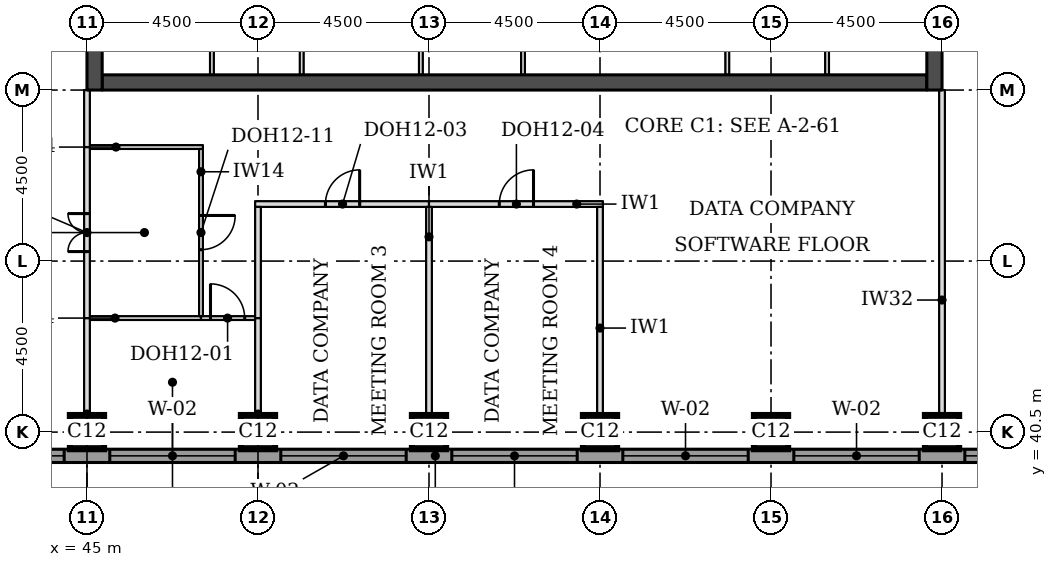
"""IFC4 building model, lengths in metres.
Left out: names, types, materials, properties, quantities, classifications, styles, units other than length and angle.
Written with IfcOpenShell. Run it as: python <this file> out.ifc"""

import sys

from ifc_helpers import new_model, si_unit, direction, frame, frame_2d, origin, origin_2d, place, context, subcontext, project, spatial, rectangle, extrude, element, fill, save


model = new_model("IFC4")
c1 = context("Model", 3, precision=1e-05, world=origin(), true_north=direction((0.0, 1.0)))
c2 = subcontext(c1, "Body", "Model", "MODEL_VIEW")
j1 = project(units=[si_unit("LENGTHUNIT", "METRE"), si_unit("PLANEANGLEUNIT", "RADIAN")], contexts=[c1])
p1 = place(None, origin())
s1 = spatial("IfcSite", under=j1, at=p1, CompositionType="ELEMENT")
p2 = place(p1, origin())
s2 = spatial("IfcBuilding", under=s1, at=p2, CompositionType="ELEMENT")
p3 = place(p2, frame((0.0, 0.0, 252.6)))
s3 = spatial("IfcBuildingStorey", under=s2, at=p3, CompositionType="ELEMENT", Elevation=252.6)
for number, where, z_axis, x_axis in (
    (1, (45.0, 40.5, 0.0), (0.0, 0.0, 1.0), (1.0, 0.0, 0.0)),
    (2, (49.5, 40.5, 0.0), (0.0, 0.0, 1.0), (1.0, 0.0, 0.0)),
    (3, (54.0, 40.5, 0.0), (0.0, 0.0, 1.0), (1.0, 0.0, 0.0)),
    (4, (58.5, 40.5, 0.0), (0.0, 0.0, 1.0), (1.0, 0.0, 0.0)),
    (5, (63.0, 40.5, 0.0), (0.0, 0.0, 1.0), (1.0, 0.0, 0.0)),
    (6, (67.5, 40.5, 0.0), (0.0, 0.0, 1.0), (1.0, 0.0, 0.0)),
):
    element("IfcColumn", number, at=place(p3, frame(where, z_axis=z_axis, x_axis=x_axis)), inside=s3, PredefinedType="COLUMN", context=c2, shape_type="SweptSolid", body=[
        extrude(rectangle(XDim=0.9, YDim=0.9, at=origin_2d()), origin(), (0.0, 0.0, 1.0), 3.7),
    ])
p4 = place(p3, frame((45.4, 49.7, 0.0), z_axis=(0.0, 0.0, 1.0), x_axis=(1.0, 0.0, 0.0)))
e7 = element("IfcWall", 7, at=p4, inside=s3, PredefinedType="SHEAR", context=c2, shape_type="SweptSolid", body=[
    extrude(rectangle(XDim=21.7, YDim=0.4, at=frame_2d((10.85, 0.0))), origin(), (0.0, 0.0, 1.0), 3.7),
])
p5 = place(p3, frame((45.2, 49.5, 0.0), z_axis=(0.0, 0.0, 1.0), x_axis=(0.0, 1.0, 0.0)))
e8 = element("IfcWall", 8, at=p5, inside=s3, PredefinedType="SHEAR", context=c2, shape_type="SweptSolid", body=[
    extrude(rectangle(XDim=22.5, YDim=0.4, at=frame_2d((11.25, 0.0))), origin(), (0.0, 0.0, 1.0), 3.7),
])
p6 = place(p5, frame((4.2, 0.0, 0.0)))
e9 = element("IfcOpeningElement", 9, at=p6, cuts=e8, PredefinedType="OPENING", context=c2, shape_type="SweptSolid", body=[
    extrude(rectangle(XDim=1.8, YDim=2.1, at=frame_2d((0.9, 1.05))), frame((0.0, 0.21, 0.0), z_axis=(0.0, -1.0, 0.0), x_axis=(1.0, 0.0, 0.0)), (0.0, 0.0, 1.0), 0.42),
])
p7 = place(p5, frame((6.9, 0.0, 0.0)))
e10 = element("IfcOpeningElement", 10, at=p7, cuts=e8, PredefinedType="OPENING", context=c2, shape_type="SweptSolid", body=[
    extrude(rectangle(XDim=1.1, YDim=2.1, at=frame_2d((0.55, 1.05))), frame((0.0, 0.21, 0.0), z_axis=(0.0, -1.0, 0.0), x_axis=(1.0, 0.0, 0.0)), (0.0, 0.0, 1.0), 0.42),
])
p8 = place(p5, frame((13.6, 0.0, 0.0)))
e11 = element("IfcOpeningElement", 11, at=p8, cuts=e8, PredefinedType="OPENING", context=c2, shape_type="SweptSolid", body=[
    extrude(rectangle(XDim=1.1, YDim=2.1, at=frame_2d((0.55, 1.05))), frame((0.0, 0.21, 0.0), z_axis=(0.0, -1.0, 0.0), x_axis=(1.0, 0.0, 0.0)), (0.0, 0.0, 1.0), 0.42),
])
p9 = place(p5, frame((16.5, 0.0, 0.0)))
e12 = element("IfcOpeningElement", 12, at=p9, cuts=e8, PredefinedType="OPENING", context=c2, shape_type="SweptSolid", body=[
    extrude(rectangle(XDim=1.8, YDim=2.1, at=frame_2d((0.9, 1.05))), frame((0.0, 0.21, 0.0), z_axis=(0.0, -1.0, 0.0), x_axis=(1.0, 0.0, 0.0)), (0.0, 0.0, 1.0), 0.42),
])
p10 = place(p3, frame((67.3, 49.5, 0.0), z_axis=(0.0, 0.0, 1.0), x_axis=(0.0, 1.0, 0.0)))
e13 = element("IfcWall", 13, at=p10, inside=s3, PredefinedType="SHEAR", context=c2, shape_type="SweptSolid", body=[
    extrude(rectangle(XDim=22.5, YDim=0.4, at=frame_2d((11.25, 0.0))), origin(), (0.0, 0.0, 1.0), 3.7),
])
p11 = place(p10, frame((4.2, 0.0, 0.0)))
e14 = element("IfcOpeningElement", 14, at=p11, cuts=e13, PredefinedType="OPENING", context=c2, shape_type="SweptSolid", body=[
    extrude(rectangle(XDim=1.8, YDim=2.1, at=frame_2d((0.9, 1.05))), frame((0.0, 0.21, 0.0), z_axis=(0.0, -1.0, 0.0), x_axis=(1.0, 0.0, 0.0)), (0.0, 0.0, 1.0), 0.42),
])
p12 = place(p10, frame((6.9, 0.0, 0.0)))
e15 = element("IfcOpeningElement", 15, at=p12, cuts=e13, PredefinedType="OPENING", context=c2, shape_type="SweptSolid", body=[
    extrude(rectangle(XDim=1.1, YDim=2.1, at=frame_2d((0.55, 1.05))), frame((0.0, 0.21, 0.0), z_axis=(0.0, -1.0, 0.0), x_axis=(1.0, 0.0, 0.0)), (0.0, 0.0, 1.0), 0.42),
])
p13 = place(p10, frame((13.6, 0.0, 0.0)))
e16 = element("IfcOpeningElement", 16, at=p13, cuts=e13, PredefinedType="OPENING", context=c2, shape_type="SweptSolid", body=[
    extrude(rectangle(XDim=1.1, YDim=2.1, at=frame_2d((0.55, 1.05))), frame((0.0, 0.21, 0.0), z_axis=(0.0, -1.0, 0.0), x_axis=(1.0, 0.0, 0.0)), (0.0, 0.0, 1.0), 0.42),
])
p14 = place(p10, frame((16.5, 0.0, 0.0)))
e17 = element("IfcOpeningElement", 17, at=p14, cuts=e13, PredefinedType="OPENING", context=c2, shape_type="SweptSolid", body=[
    extrude(rectangle(XDim=1.8, YDim=2.1, at=frame_2d((0.9, 1.05))), frame((0.0, 0.21, 0.0), z_axis=(0.0, -1.0, 0.0), x_axis=(1.0, 0.0, 0.0)), (0.0, 0.0, 1.0), 0.42),
])
p15 = place(p3, frame((36.0, 39.875, 0.0), z_axis=(0.0, 0.0, 1.0), x_axis=(1.0, 0.0, 0.0)))
e18 = element("IfcWall", 18, at=p15, inside=s3, PredefinedType="STANDARD", context=c2, shape_type="SweptSolid", body=[
    extrude(rectangle(XDim=36.331, YDim=0.35, at=frame_2d((18.166, 0.0))), origin(), (0.0, 0.0, 1.0), 3.525),
])
p16 = place(p15, frame((0.6, 0.0, 0.9)))
e19 = element("IfcOpeningElement", 19, at=p16, cuts=e18, PredefinedType="OPENING", context=c2, shape_type="SweptSolid", body=[
    extrude(rectangle(XDim=3.3, YDim=1.9, at=frame_2d((1.65, 0.95))), frame((0.0, 0.185, 0.0), z_axis=(0.0, -1.0, 0.0), x_axis=(1.0, 0.0, 0.0)), (0.0, 0.0, 1.0), 0.37),
])
p17 = place(p15, frame((5.1, 0.0, 0.9)))
e20 = element("IfcOpeningElement", 20, at=p17, cuts=e18, PredefinedType="OPENING", context=c2, shape_type="SweptSolid", body=[
    extrude(rectangle(XDim=3.3, YDim=1.9, at=frame_2d((1.65, 0.95))), frame((0.0, 0.185, 0.0), z_axis=(0.0, -1.0, 0.0), x_axis=(1.0, 0.0, 0.0)), (0.0, 0.0, 1.0), 0.37),
])
p18 = place(p15, frame((9.6, 0.0, 0.9)))
e21 = element("IfcOpeningElement", 21, at=p18, cuts=e18, PredefinedType="OPENING", context=c2, shape_type="SweptSolid", body=[
    extrude(rectangle(XDim=3.3, YDim=1.9, at=frame_2d((1.65, 0.95))), frame((0.0, 0.185, 0.0), z_axis=(0.0, -1.0, 0.0), x_axis=(1.0, 0.0, 0.0)), (0.0, 0.0, 1.0), 0.37),
])
p19 = place(p15, frame((14.1, 0.0, 0.9)))
e22 = element("IfcOpeningElement", 22, at=p19, cuts=e18, PredefinedType="OPENING", context=c2, shape_type="SweptSolid", body=[
    extrude(rectangle(XDim=3.3, YDim=1.9, at=frame_2d((1.65, 0.95))), frame((0.0, 0.185, 0.0), z_axis=(0.0, -1.0, 0.0), x_axis=(1.0, 0.0, 0.0)), (0.0, 0.0, 1.0), 0.37),
])
p20 = place(p15, frame((18.6, 0.0, 0.9)))
e23 = element("IfcOpeningElement", 23, at=p20, cuts=e18, PredefinedType="OPENING", context=c2, shape_type="SweptSolid", body=[
    extrude(rectangle(XDim=3.3, YDim=1.9, at=frame_2d((1.65, 0.95))), frame((0.0, 0.185, 0.0), z_axis=(0.0, -1.0, 0.0), x_axis=(1.0, 0.0, 0.0)), (0.0, 0.0, 1.0), 0.37),
])
p21 = place(p15, frame((23.1, 0.0, 0.9)))
e24 = element("IfcOpeningElement", 24, at=p21, cuts=e18, PredefinedType="OPENING", context=c2, shape_type="SweptSolid", body=[
    extrude(rectangle(XDim=3.3, YDim=1.9, at=frame_2d((1.65, 0.95))), frame((0.0, 0.185, 0.0), z_axis=(0.0, -1.0, 0.0), x_axis=(1.0, 0.0, 0.0)), (0.0, 0.0, 1.0), 0.37),
])
p22 = place(p15, frame((27.6, 0.0, 0.9)))
e25 = element("IfcOpeningElement", 25, at=p22, cuts=e18, PredefinedType="OPENING", context=c2, shape_type="SweptSolid", body=[
    extrude(rectangle(XDim=3.3, YDim=1.9, at=frame_2d((1.65, 0.95))), frame((0.0, 0.185, 0.0), z_axis=(0.0, -1.0, 0.0), x_axis=(1.0, 0.0, 0.0)), (0.0, 0.0, 1.0), 0.37),
])
p23 = place(p15, frame((32.1, 0.0, 0.9)))
e26 = element("IfcOpeningElement", 26, at=p23, cuts=e18, PredefinedType="OPENING", context=c2, shape_type="SweptSolid", body=[
    extrude(rectangle(XDim=3.3, YDim=1.9, at=frame_2d((1.65, 0.95))), frame((0.0, 0.185, 0.0), z_axis=(0.0, -1.0, 0.0), x_axis=(1.0, 0.0, 0.0)), (0.0, 0.0, 1.0), 0.37),
])
p24 = place(p3, frame((45.075, 43.5, 0.0), z_axis=(0.0, 0.0, 1.0), x_axis=(1.0, 0.0, 0.0)))
e27 = element("IfcWall", 27, at=p24, inside=s3, PredefinedType="PARTITIONING", context=c2, shape_type="SweptSolid", body=[
    extrude(rectangle(XDim=2.925, YDim=0.1, at=frame_2d((1.462, 0.0))), origin(), (0.0, 0.0, 1.0), 3.55),
])
p25 = place(p3, frame((48.0, 43.5, 0.0), z_axis=(0.0, 0.0, 1.0), x_axis=(1.0, 0.0, 0.0)))
e28 = element("IfcWall", 28, at=p25, inside=s3, PredefinedType="PARTITIONING", context=c2, shape_type="SweptSolid", body=[
    extrude(rectangle(XDim=1.425, YDim=0.1, at=frame_2d((0.712, 0.0))), origin(), (0.0, 0.0, 1.0), 3.55),
])
p26 = place(p25, frame((0.25, 0.0, 0.0)))
e29 = element("IfcOpeningElement", 29, at=p26, cuts=e28, PredefinedType="OPENING", context=c2, shape_type="SweptSolid", body=[
    extrude(rectangle(XDim=0.9, YDim=2.1, at=frame_2d((0.45, 1.05))), frame((0.0, 0.06, 0.0), z_axis=(0.0, -1.0, 0.0), x_axis=(1.0, 0.0, 0.0)), (0.0, 0.0, 1.0), 0.12),
])
p27 = place(p3, frame((49.425, 46.5, 0.0), z_axis=(0.0, 0.0, 1.0), x_axis=(1.0, 0.0, 0.0)))
e30 = element("IfcWall", 30, at=p27, inside=s3, PredefinedType="PARTITIONING", context=c2, shape_type="SweptSolid", body=[
    extrude(rectangle(XDim=4.575, YDim=0.15, at=frame_2d((2.288, 0.0))), origin(), (0.0, 0.0, 1.0), 3.55),
])
p28 = place(p27, frame((1.85, 0.0, 0.0)))
e31 = element("IfcOpeningElement", 31, at=p28, cuts=e30, PredefinedType="OPENING", context=c2, shape_type="SweptSolid", body=[
    extrude(rectangle(XDim=0.9, YDim=2.1, at=frame_2d((0.45, 1.05))), frame((0.0, 0.085, 0.0), z_axis=(0.0, -1.0, 0.0), x_axis=(1.0, 0.0, 0.0)), (0.0, 0.0, 1.0), 0.17),
])
p29 = place(p3, frame((54.0, 46.5, 0.0), z_axis=(0.0, 0.0, 1.0), x_axis=(1.0, 0.0, 0.0)))
e32 = element("IfcWall", 32, at=p29, inside=s3, PredefinedType="PARTITIONING", context=c2, shape_type="SweptSolid", body=[
    extrude(rectangle(XDim=4.575, YDim=0.15, at=frame_2d((2.288, 0.0))), origin(), (0.0, 0.0, 1.0), 3.55),
])
p30 = place(p29, frame((1.85, 0.0, 0.0)))
e33 = element("IfcOpeningElement", 33, at=p30, cuts=e32, PredefinedType="OPENING", context=c2, shape_type="SweptSolid", body=[
    extrude(rectangle(XDim=0.9, YDim=2.1, at=frame_2d((0.45, 1.05))), frame((0.0, 0.085, 0.0), z_axis=(0.0, -1.0, 0.0), x_axis=(1.0, 0.0, 0.0)), (0.0, 0.0, 1.0), 0.17),
])
p31 = place(p3, frame((45.075, 48.0, 0.0), z_axis=(0.0, 0.0, 1.0), x_axis=(1.0, 0.0, 0.0)))
e34 = element("IfcWall", 34, at=p31, inside=s3, PredefinedType="PARTITIONING", context=c2, shape_type="SweptSolid", body=[
    extrude(rectangle(XDim=2.975, YDim=0.1, at=frame_2d((1.488, 0.0))), origin(), (0.0, 0.0, 1.0), 3.55),
])
p32 = place(p3, frame((45.0, 40.05, 0.0), z_axis=(0.0, 0.0, 1.0), x_axis=(0.0, 1.0, 0.0)))
e35 = element("IfcWall", 35, at=p32, inside=s3, PredefinedType="PARTITIONING", context=c2, shape_type="SweptSolid", body=[
    extrude(rectangle(XDim=3.45, YDim=0.15, at=frame_2d((1.725, 0.0))), origin(), (0.0, 0.0, 1.0), 3.022),
])
p33 = place(p3, frame((49.5, 40.05, 0.0), z_axis=(0.0, 0.0, 1.0), x_axis=(0.0, 1.0, 0.0)))
e36 = element("IfcWall", 36, at=p33, inside=s3, PredefinedType="PARTITIONING", context=c2, shape_type="SweptSolid", body=[
    extrude(rectangle(XDim=3.45, YDim=0.15, at=frame_2d((1.725, 0.0))), origin(), (0.0, 0.0, 1.0), 3.55),
])
for number, where, z_axis, x_axis in (
    (37, (54.0, 40.05, 0.0), (0.0, 0.0, 1.0), (0.0, 1.0, 0.0)),
    (38, (58.5, 40.05, 0.0), (0.0, 0.0, 1.0), (0.0, 1.0, 0.0)),
):
    element("IfcWall", number, at=place(p3, frame(where, z_axis=z_axis, x_axis=x_axis)), inside=s3, PredefinedType="PARTITIONING", context=c2, shape_type="SweptSolid", body=[
        extrude(rectangle(XDim=6.375, YDim=0.15, at=frame_2d((3.188, 0.0))), origin(), (0.0, 0.0, 1.0), 3.55),
    ])
p34 = place(p3, frame((67.5, 40.05, 0.0), z_axis=(0.0, 0.0, 1.0), x_axis=(0.0, 1.0, 0.0)))
e39 = element("IfcWall", 39, at=p34, inside=s3, PredefinedType="PARTITIONING", context=c2, shape_type="SweptSolid", body=[
    extrude(rectangle(XDim=9.45, YDim=0.15, at=frame_2d((4.725, 0.0))), origin(), (0.0, 0.0, 1.0), 3.022),
])
p35 = place(p3, frame((45.0, 43.5, 0.0), z_axis=(0.0, 0.0, 1.0), x_axis=(0.0, 1.0, 0.0)))
e40 = element("IfcWall", 40, at=p35, inside=s3, PredefinedType="PARTITIONING", context=c2, shape_type="SweptSolid", body=[
    extrude(rectangle(XDim=4.5, YDim=0.15, at=frame_2d((2.25, 0.0))), origin(), (0.0, 0.0, 1.0), 3.022),
])
p36 = place(p35, frame((1.75, 0.0, 0.0)))
e41 = element("IfcOpeningElement", 41, at=p36, cuts=e40, PredefinedType="OPENING", context=c2, shape_type="SweptSolid", body=[
    extrude(rectangle(XDim=1.0, YDim=2.1, at=frame_2d((0.5, 1.05))), frame((0.0, 0.085, 0.0), z_axis=(0.0, -1.0, 0.0), x_axis=(1.0, 0.0, 0.0)), (0.0, 0.0, 1.0), 0.17),
])
p37 = place(p3, frame((49.5, 43.5, 0.0), z_axis=(0.0, 0.0, 1.0), x_axis=(0.0, 1.0, 0.0)))
e42 = element("IfcWall", 42, at=p37, inside=s3, PredefinedType="PARTITIONING", context=c2, shape_type="SweptSolid", body=[
    extrude(rectangle(XDim=2.925, YDim=0.15, at=frame_2d((1.462, 0.0))), origin(), (0.0, 0.0, 1.0), 3.55),
])
p38 = place(p3, frame((48.0, 43.55, 0.0), z_axis=(0.0, 0.0, 1.0), x_axis=(0.0, 1.0, 0.0)))
e43 = element("IfcWall", 43, at=p38, inside=s3, PredefinedType="PARTITIONING", context=c2, shape_type="SweptSolid", body=[
    extrude(rectangle(XDim=4.4, YDim=0.1, at=frame_2d((2.2, 0.0))), origin(), (0.0, 0.0, 1.0), 3.55),
])
p39 = place(p38, frame((1.75, 0.0, 0.0)))
e44 = element("IfcOpeningElement", 44, at=p39, cuts=e43, PredefinedType="OPENING", context=c2, shape_type="SweptSolid", body=[
    extrude(rectangle(XDim=0.9, YDim=2.1, at=frame_2d((0.45, 1.05))), frame((0.0, 0.06, 0.0), z_axis=(0.0, -1.0, 0.0), x_axis=(1.0, 0.0, 0.0)), (0.0, 0.0, 1.0), 0.12),
])
p40 = place(p3, frame((45.0, 48.0, 0.0), z_axis=(0.0, 0.0, 1.0), x_axis=(0.0, 1.0, 0.0)))
e45 = element("IfcWall", 45, at=p40, inside=s3, PredefinedType="PARTITIONING", context=c2, shape_type="SweptSolid", body=[
    extrude(rectangle(XDim=1.5, YDim=0.15, at=frame_2d((0.75, 0.0))), origin(), (0.0, 0.0, 1.0), 3.022),
])
for number, where, z_axis, x_axis in (
    (46, (48.288, 49.9, 0.0), (0.0, 0.0, 1.0), (0.0, 1.0, 0.0)),
    (47, (50.65, 49.9, 0.0), (0.0, 0.0, 1.0), (0.0, 1.0, 0.0)),
    (48, (53.786, 49.9, 0.0), (0.0, 0.0, 1.0), (0.0, 1.0, 0.0)),
    (49, (56.474, 49.9, 0.0), (0.0, 0.0, 1.0), (0.0, 1.0, 0.0)),
    (50, (61.85, 49.9, 0.0), (0.0, 0.0, 1.0), (0.0, 1.0, 0.0)),
    (51, (64.475, 49.9, 0.0), (0.0, 0.0, 1.0), (0.0, 1.0, 0.0)),
):
    element("IfcWall", number, at=place(p3, frame(where, z_axis=z_axis, x_axis=x_axis)), inside=s3, PredefinedType="PARTITIONING", context=c2, shape_type="SweptSolid", body=[
        extrude(rectangle(XDim=3.1, YDim=0.1, at=frame_2d((1.55, 0.0))), origin(), (0.0, 0.0, 1.0), 3.55),
    ])
p41 = place(p17, origin())
e52 = element("IfcWindow", 52, at=p41, inside=s3, PartitioningType="SINGLE_PANEL", PredefinedType="WINDOW", context=c2, shape_type="SweptSolid", body=[
    extrude(rectangle(XDim=3.3, YDim=1.9, at=frame_2d((1.65, 0.95))), frame((0.0, 0.085, 0.0), z_axis=(0.0, -1.0, 0.0), x_axis=(1.0, 0.0, 0.0)), (0.0, 0.0, 1.0), 0.06),
])
fill(e20, e52)
p42 = place(p18, origin())
e53 = element("IfcWindow", 53, at=p42, inside=s3, PartitioningType="SINGLE_PANEL", PredefinedType="WINDOW", context=c2, shape_type="SweptSolid", body=[
    extrude(rectangle(XDim=3.3, YDim=1.9, at=frame_2d((1.65, 0.95))), frame((0.0, 0.085, 0.0), z_axis=(0.0, -1.0, 0.0), x_axis=(1.0, 0.0, 0.0)), (0.0, 0.0, 1.0), 0.06),
])
fill(e21, e53)
p43 = place(p19, origin())
e54 = element("IfcWindow", 54, at=p43, inside=s3, PartitioningType="SINGLE_PANEL", PredefinedType="WINDOW", context=c2, shape_type="SweptSolid", body=[
    extrude(rectangle(XDim=3.3, YDim=1.9, at=frame_2d((1.65, 0.95))), frame((0.0, 0.085, 0.0), z_axis=(0.0, -1.0, 0.0), x_axis=(1.0, 0.0, 0.0)), (0.0, 0.0, 1.0), 0.06),
])
fill(e22, e54)
p44 = place(p20, origin())
e55 = element("IfcWindow", 55, at=p44, inside=s3, PartitioningType="SINGLE_PANEL", PredefinedType="WINDOW", context=c2, shape_type="SweptSolid", body=[
    extrude(rectangle(XDim=3.3, YDim=1.9, at=frame_2d((1.65, 0.95))), frame((0.0, 0.085, 0.0), z_axis=(0.0, -1.0, 0.0), x_axis=(1.0, 0.0, 0.0)), (0.0, 0.0, 1.0), 0.06),
])
fill(e23, e55)
p45 = place(p21, origin())
e56 = element("IfcWindow", 56, at=p45, inside=s3, PartitioningType="SINGLE_PANEL", PredefinedType="WINDOW", context=c2, shape_type="SweptSolid", body=[
    extrude(rectangle(XDim=3.3, YDim=1.9, at=frame_2d((1.65, 0.95))), frame((0.0, 0.085, 0.0), z_axis=(0.0, -1.0, 0.0), x_axis=(1.0, 0.0, 0.0)), (0.0, 0.0, 1.0), 0.06),
])
fill(e24, e56)
p46 = place(p22, origin())
e57 = element("IfcWindow", 57, at=p46, inside=s3, PartitioningType="SINGLE_PANEL", PredefinedType="WINDOW", context=c2, shape_type="SweptSolid", body=[
    extrude(rectangle(XDim=3.3, YDim=1.9, at=frame_2d((1.65, 0.95))), frame((0.0, 0.085, 0.0), z_axis=(0.0, -1.0, 0.0), x_axis=(1.0, 0.0, 0.0)), (0.0, 0.0, 1.0), 0.06),
])
fill(e25, e57)
p47 = place(p23, origin())
e58 = element("IfcWindow", 58, at=p47, inside=s3, PartitioningType="SINGLE_PANEL", PredefinedType="WINDOW", context=c2, shape_type="SweptSolid", body=[
    extrude(rectangle(XDim=3.3, YDim=1.9, at=frame_2d((1.65, 0.95))), frame((0.0, 0.085, 0.0), z_axis=(0.0, -1.0, 0.0), x_axis=(1.0, 0.0, 0.0)), (0.0, 0.0, 1.0), 0.06),
])
fill(e26, e58)
p48 = place(p36, origin())
e59 = element("IfcDoor", 59, at=p48, inside=s3, OperationType="DOUBLE_DOOR_SINGLE_SWING", PredefinedType="DOOR", context=c2, shape_type="SweptSolid", body=[
    extrude(rectangle(XDim=1.0, YDim=2.1, at=frame_2d((0.5, 1.05))), frame((0.0, 0.025, 0.0), z_axis=(0.0, -1.0, 0.0), x_axis=(1.0, 0.0, 0.0)), (0.0, 0.0, 1.0), 0.05),
])
fill(e41, e59)
p49 = place(p39, frame((0.9, 0.0, 0.0), z_axis=(0.0, 0.0, 1.0), x_axis=(-1.0, 0.0, 0.0)))
e60 = element("IfcDoor", 60, at=p49, inside=s3, OperationType="SINGLE_SWING_LEFT", PredefinedType="DOOR", context=c2, shape_type="SweptSolid", body=[
    extrude(rectangle(XDim=0.9, YDim=2.1, at=frame_2d((0.45, 1.05))), frame((0.0, 0.025, 0.0), z_axis=(0.0, -1.0, 0.0), x_axis=(1.0, 0.0, 0.0)), (0.0, 0.0, 1.0), 0.05),
])
fill(e44, e60)
p50 = place(p28, origin())
e61 = element("IfcDoor", 61, at=p50, inside=s3, OperationType="SINGLE_SWING_RIGHT", PredefinedType="DOOR", context=c2, shape_type="SweptSolid", body=[
    extrude(rectangle(XDim=0.9, YDim=2.1, at=frame_2d((0.45, 1.05))), frame((0.0, 0.025, 0.0), z_axis=(0.0, -1.0, 0.0), x_axis=(1.0, 0.0, 0.0)), (0.0, 0.0, 1.0), 0.05),
])
fill(e31, e61)
p51 = place(p30, origin())
e62 = element("IfcDoor", 62, at=p51, inside=s3, OperationType="SINGLE_SWING_RIGHT", PredefinedType="DOOR", context=c2, shape_type="SweptSolid", body=[
    extrude(rectangle(XDim=0.9, YDim=2.1, at=frame_2d((0.45, 1.05))), frame((0.0, 0.025, 0.0), z_axis=(0.0, -1.0, 0.0), x_axis=(1.0, 0.0, 0.0)), (0.0, 0.0, 1.0), 0.05),
])
fill(e33, e62)
p52 = place(p26, origin())
e63 = element("IfcDoor", 63, at=p52, inside=s3, OperationType="SINGLE_SWING_LEFT", PredefinedType="DOOR", context=c2, shape_type="SweptSolid", body=[
    extrude(rectangle(XDim=0.9, YDim=2.1, at=frame_2d((0.45, 1.05))), frame((0.0, 0.025, 0.0), z_axis=(0.0, -1.0, 0.0), x_axis=(1.0, 0.0, 0.0)), (0.0, 0.0, 1.0), 0.05),
])
fill(e29, e63)
save(model, sys.argv[1])
